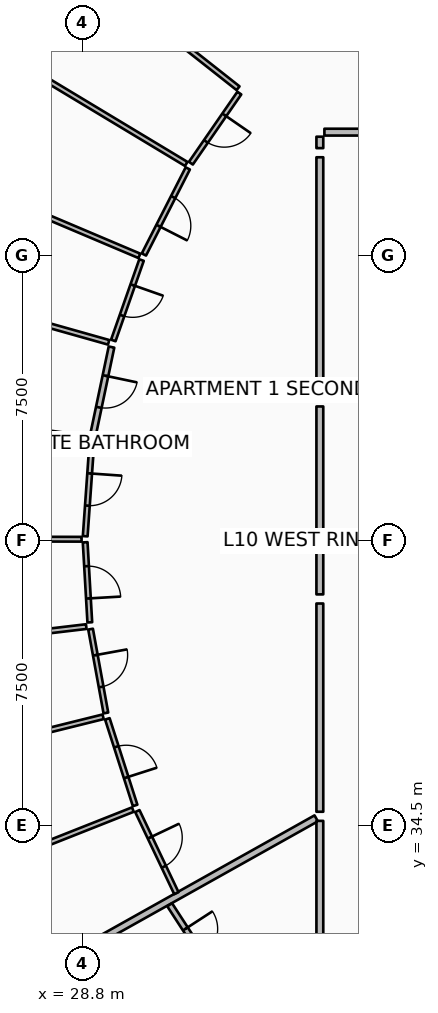
"""IFC4 building model, lengths in metres.
Left out: names, types, materials, properties, quantities, classifications, styles, units other than length and angle.
Written with IfcOpenShell. Run it as: python <this file> out.ifc"""

import sys

from ifc_helpers import new_model, si_unit, direction, frame, frame_2d, origin, place, context, subcontext, project, spatial, rectangle, extrude, element, fill, save


model = new_model("IFC4")
c1 = context("Model", 3, precision=1e-05, world=origin(), true_north=direction((0.0, 1.0)))
c2 = subcontext(c1, "Body", "Model", "MODEL_VIEW")
j1 = project(units=[si_unit("LENGTHUNIT", "METRE"), si_unit("PLANEANGLEUNIT", "RADIAN")], contexts=[c1])
p1 = place(None, origin())
s1 = spatial("IfcSite", under=j1, at=p1, CompositionType="ELEMENT")
p2 = place(p1, origin())
s2 = spatial("IfcBuilding", under=s1, at=p2, CompositionType="ELEMENT")
p3 = place(p2, frame((0.0, 0.0, 45.15)))
s3 = spatial("IfcBuildingStorey", under=s2, at=p3, CompositionType="ELEMENT", Elevation=45.15)
p4 = place(p3, frame((34.954, 34.694, 0.0), z_axis=(0.0, 0.0, 1.0), x_axis=(-0.872493465611, -0.488625779577, 0.0)))
e1 = element("IfcWall", 1, at=p4, inside=s3, PredefinedType="PARTITIONING", context=c2, shape_type="SweptSolid", body=[
    extrude(rectangle(XDim=16.586, YDim=0.18, at=frame_2d((8.293, 0.0))), origin(), (0.0, 0.0, 1.0), 2.867),
])
p5 = place(p3, frame((41.86, 52.75, 0.0), z_axis=(0.0, 0.0, 1.0), x_axis=(-1.0, 0.0, 0.0)))
e2 = element("IfcWall", 2, at=p5, inside=s3, PredefinedType="PARTITIONING", context=c2, shape_type="SweptSolid", body=[
    extrude(rectangle(XDim=6.69, YDim=0.18, at=frame_2d((3.345, 0.0))), origin(), (0.0, 0.0, 1.0), 2.867),
])
p6 = place(p5, frame((2.795, 0.0, 0.0)))
e3 = element("IfcOpeningElement", 3, at=p6, cuts=e2, PredefinedType="OPENING", context=c2, shape_type="SweptSolid", body=[
    extrude(rectangle(XDim=1.1, YDim=2.1, at=frame_2d((0.55, 1.05))), frame((0.0, 0.1, 0.0), z_axis=(0.0, -1.0, 0.0), x_axis=(1.0, 0.0, 0.0)), (0.0, 0.0, 1.0), 0.2),
])
p7 = place(p3, frame((35.05, 52.63, 0.0), z_axis=(0.0, 0.0, 1.0), x_axis=(0.0, -1.0, 0.0)))
e4 = element("IfcWall", 4, at=p7, inside=s3, PredefinedType="PARTITIONING", context=c2, shape_type="SweptSolid", body=[
    extrude(rectangle(XDim=0.301, YDim=0.18, at=frame_2d((0.15, 0.0))), origin(), (0.0, 0.0, 1.0), 2.867),
])
p8 = place(p3, frame((35.05, 52.089, 0.0), z_axis=(0.0, 0.0, 1.0), x_axis=(0.0, -1.0, 0.0)))
e5 = element("IfcWall", 5, at=p8, inside=s3, PredefinedType="PARTITIONING", context=c2, shape_type="SweptSolid", body=[
    extrude(rectangle(XDim=6.317, YDim=0.18, at=frame_2d((3.158, 0.0))), origin(), (0.0, 0.0, 1.0), 2.867),
])
p9 = place(p3, frame((32.898, 53.905, 0.0), z_axis=(0.0, 0.0, 1.0), x_axis=(-0.78532854108, 0.619079221558, 0.0)))
e6 = element("IfcWall", 6, at=p9, inside=s3, PredefinedType="PARTITIONING", context=c2, shape_type="SweptSolid", body=[
    extrude(rectangle(XDim=8.842, YDim=0.125, at=frame_2d((4.421, 0.0))), origin(), (0.0, 0.0, 1.0), 2.867),
])
p10 = place(p3, frame((31.534, 51.913, 0.0), z_axis=(0.0, 0.0, 1.0), x_axis=(-0.856706990958, 0.515803384676, 0.0)))
e7 = element("IfcWall", 7, at=p10, inside=s3, PredefinedType="PARTITIONING", context=c2, shape_type="SweptSolid", body=[
    extrude(rectangle(XDim=9.057, YDim=0.125, at=frame_2d((4.528, 0.0))), origin(), (0.0, 0.0, 1.0), 2.94),
])
p11 = place(p3, frame((30.301, 49.494, 0.0), z_axis=(0.0, 0.0, 1.0), x_axis=(-0.920840746031, 0.389938867579, 0.0)))
e8 = element("IfcWall", 8, at=p11, inside=s3, PredefinedType="PARTITIONING", context=c2, shape_type="SweptSolid", body=[
    extrude(rectangle(XDim=9.966, YDim=0.125, at=frame_2d((4.983, 0.0))), origin(), (0.0, 0.0, 1.0), 2.94),
])
p12 = place(p3, frame((32.931, 53.778, 0.0), z_axis=(0.0, 0.0, 1.0), x_axis=(-0.568541738061, -0.822654418382, 0.0)))
e9 = element("IfcWall", 9, at=p12, inside=s3, PredefinedType="PARTITIONING", context=c2, shape_type="SweptSolid", body=[
    extrude(rectangle(XDim=2.242, YDim=0.125, at=frame_2d((1.121, 0.0))), origin(), (0.0, 0.0, 1.0), 2.867),
])
p13 = place(p12, frame((0.696, 0.0, 0.0)))
e10 = element("IfcOpeningElement", 10, at=p13, cuts=e9, PredefinedType="OPENING", context=c2, shape_type="SweptSolid", body=[
    extrude(rectangle(XDim=0.85, YDim=2.06, at=frame_2d((0.425, 1.03))), frame((0.0, 0.073, 0.0), z_axis=(0.0, -1.0, 0.0), x_axis=(1.0, 0.0, 0.0)), (0.0, 0.0, 1.0), 0.145),
])
p14 = place(p3, frame((31.575, 51.796, 0.0), z_axis=(0.0, 0.0, 1.0), x_axis=(-0.454037986735, -0.890982326762, 0.0)))
e11 = element("IfcWall", 11, at=p14, inside=s3, PredefinedType="PARTITIONING", context=c2, shape_type="SweptSolid", body=[
    extrude(rectangle(XDim=2.542, YDim=0.125, at=frame_2d((1.271, 0.0))), origin(), (0.0, 0.0, 1.0), 2.94),
])
p15 = place(p14, frame((0.846, 0.0, 0.0)))
e12 = element("IfcOpeningElement", 12, at=p15, cuts=e11, PredefinedType="OPENING", context=c2, shape_type="SweptSolid", body=[
    extrude(rectangle(XDim=0.85, YDim=2.06, at=frame_2d((0.425, 1.03))), frame((0.0, 0.073, 0.0), z_axis=(0.0, -1.0, 0.0), x_axis=(1.0, 0.0, 0.0)), (0.0, 0.0, 1.0), 0.145),
])
p16 = place(p3, frame((30.358, 49.384, 0.0), z_axis=(0.0, 0.0, 1.0), x_axis=(-0.331344536708, -0.943509829304, 0.0)))
e13 = element("IfcWall", 13, at=p16, inside=s3, PredefinedType="PARTITIONING", context=c2, shape_type="SweptSolid", body=[
    extrude(rectangle(XDim=2.242, YDim=0.125, at=frame_2d((1.121, 0.0))), origin(), (0.0, 0.0, 1.0), 2.867),
])
p17 = place(p16, frame((0.696, 0.0, 0.0)))
e14 = element("IfcOpeningElement", 14, at=p17, cuts=e13, PredefinedType="OPENING", context=c2, shape_type="SweptSolid", body=[
    extrude(rectangle(XDim=0.85, YDim=2.06, at=frame_2d((0.425, 1.03))), frame((0.0, 0.073, 0.0), z_axis=(0.0, -1.0, 0.0), x_axis=(1.0, 0.0, 0.0)), (0.0, 0.0, 1.0), 0.145),
])
p18 = place(p3, frame((35.05, 45.532, 0.0), z_axis=(0.0, 0.0, 1.0), x_axis=(0.0, -1.0, 0.0)))
e15 = element("IfcWall", 15, at=p18, inside=s3, PredefinedType="PARTITIONING", context=c2, shape_type="SweptSolid", body=[
    extrude(rectangle(XDim=4.945, YDim=0.18, at=frame_2d((2.472, 0.0))), origin(), (0.0, 0.0, 1.0), 2.867),
])
p19 = place(p3, frame((29.492, 47.22, 0.0), z_axis=(0.0, 0.0, 1.0), x_axis=(-0.962454721813, 0.271442274635, 0.0)))
e16 = element("IfcWall", 16, at=p19, inside=s3, PredefinedType="PARTITIONING", context=c2, shape_type="SweptSolid", body=[
    extrude(rectangle(XDim=11.344, YDim=0.125, at=frame_2d((5.672, 0.0))), origin(), (0.0, 0.0, 1.0), 2.867),
])
p20 = place(p3, frame((29.568, 47.095, 0.0), z_axis=(0.0, 0.0, 1.0), x_axis=(-0.205861309483, -0.978581177654, 0.0)))
e17 = element("IfcWall", 17, at=p20, inside=s3, PredefinedType="PARTITIONING", context=c2, shape_type="SweptSolid", body=[
    extrude(rectangle(XDim=2.392, YDim=0.15, at=frame_2d((1.196, 0.0))), origin(), (0.0, 0.0, 1.0), 2.867),
])
p21 = place(p20, frame((0.771, 0.0, 0.0)))
e18 = element("IfcOpeningElement", 18, at=p21, cuts=e17, PredefinedType="OPENING", context=c2, shape_type="SweptSolid", body=[
    extrude(rectangle(XDim=0.85, YDim=2.06, at=frame_2d((0.425, 1.03))), frame((0.0, 0.085, 0.0), z_axis=(0.0, -1.0, 0.0), x_axis=(1.0, 0.0, 0.0)), (0.0, 0.0, 1.0), 0.17),
])
p22 = place(p3, frame((28.968, 44.678, 0.0), z_axis=(0.0, 0.0, 1.0), x_axis=(-0.990240767804, 0.139367219172, 0.0)))
e19 = element("IfcWall", 19, at=p22, inside=s3, PredefinedType="PARTITIONING", context=c2, shape_type="SweptSolid", body=[
    extrude(rectangle(XDim=4.46, YDim=0.15, at=frame_2d((2.23, 0.0))), origin(), (0.0, 0.0, 1.0), 2.94),
])
p23 = place(p3, frame((28.78, 42.038, 0.0), z_axis=(0.0, 0.0, 1.0), x_axis=(-0.999998036955, 0.001981435282, 0.0)))
e20 = element("IfcWall", 20, at=p23, inside=s3, PredefinedType="PARTITIONING", context=c2, shape_type="SweptSolid", body=[
    extrude(rectangle(XDim=12.075, YDim=0.125, at=frame_2d((6.038, 0.0))), origin(), (0.0, 0.0, 1.0), 2.94),
])
p24 = place(p3, frame((29.05, 44.576, 0.0), z_axis=(0.0, 0.0, 1.0), x_axis=(-0.070831673661, -0.997488282641, 0.0)))
e21 = element("IfcWall", 21, at=p24, inside=s3, PredefinedType="PARTITIONING", context=c2, shape_type="SweptSolid", body=[
    extrude(rectangle(XDim=2.464, YDim=0.125, at=frame_2d((1.232, 0.0))), origin(), (0.0, 0.0, 1.0), 2.94),
])
p25 = place(p24, frame((0.807, 0.0, 0.0)))
e22 = element("IfcOpeningElement", 22, at=p25, cuts=e21, PredefinedType="OPENING", context=c2, shape_type="SweptSolid", body=[
    extrude(rectangle(XDim=0.85, YDim=2.06, at=frame_2d((0.425, 1.03))), frame((0.0, 0.073, 0.0), z_axis=(0.0, -1.0, 0.0), x_axis=(1.0, 0.0, 0.0)), (0.0, 0.0, 1.0), 0.145),
])
p26 = place(p3, frame((28.875, 41.958, 0.0), z_axis=(0.0, 0.0, 1.0), x_axis=(0.057962417622, -0.998318765797, 0.0)))
e23 = element("IfcWall", 23, at=p26, inside=s3, PredefinedType="PARTITIONING", context=c2, shape_type="SweptSolid", body=[
    extrude(rectangle(XDim=2.11, YDim=0.125, at=frame_2d((1.055, 0.0))), origin(), (0.0, 0.0, 1.0), 2.867),
])
p27 = place(p26, frame((0.63, 0.0, 0.0)))
e24 = element("IfcOpeningElement", 24, at=p27, cuts=e23, PredefinedType="OPENING", context=c2, shape_type="SweptSolid", body=[
    extrude(rectangle(XDim=0.85, YDim=2.06, at=frame_2d((0.425, 1.03))), frame((0.0, 0.073, 0.0), z_axis=(0.0, -1.0, 0.0), x_axis=(1.0, 0.0, 0.0)), (0.0, 0.0, 1.0), 0.145),
])
p28 = place(p3, frame((35.05, 40.347, 0.0), z_axis=(0.0, 0.0, 1.0), x_axis=(0.0, -1.0, 0.0)))
e25 = element("IfcWall", 25, at=p28, inside=s3, PredefinedType="PARTITIONING", context=c2, shape_type="SweptSolid", body=[
    extrude(rectangle(XDim=5.48, YDim=0.18, at=frame_2d((2.74, 0.0))), origin(), (0.0, 0.0, 1.0), 2.867),
])
p29 = place(p3, frame((28.903, 39.74, 0.0), z_axis=(0.0, 0.0, 1.0), x_axis=(-0.993068040113, -0.117540919282, 0.0)))
e26 = element("IfcWall", 26, at=p29, inside=s3, PredefinedType="PARTITIONING", context=c2, shape_type="SweptSolid", body=[
    extrude(rectangle(XDim=12.309, YDim=0.125, at=frame_2d((6.154, 0.0))), origin(), (0.0, 0.0, 1.0), 2.867),
])
p30 = place(p3, frame((29.347, 37.366, 0.0), z_axis=(0.0, 0.0, 1.0), x_axis=(-0.970510462135, -0.241059002917, 0.0)))
e27 = element("IfcWall", 27, at=p30, inside=s3, PredefinedType="PARTITIONING", context=c2, shape_type="SweptSolid", body=[
    extrude(rectangle(XDim=11.79, YDim=0.125, at=frame_2d((5.895, 0.0))), origin(), (0.0, 0.0, 1.0), 2.94),
])
p31 = place(p3, frame((30.13, 34.925, 0.0), z_axis=(0.0, 0.0, 1.0), x_axis=(-0.929770978957, -0.368138461302, 0.0)))
e28 = element("IfcWall", 28, at=p31, inside=s3, PredefinedType="PARTITIONING", context=c2, shape_type="SweptSolid", body=[
    extrude(rectangle(XDim=11.773, YDim=0.125, at=frame_2d((5.887, 0.0))), origin(), (0.0, 0.0, 1.0), 2.94),
])
p32 = place(p3, frame((29.017, 39.673, 0.0), z_axis=(0.0, 0.0, 1.0), x_axis=(0.179632658462, -0.983733758704, 0.0)))
e29 = element("IfcWall", 29, at=p32, inside=s3, PredefinedType="PARTITIONING", context=c2, shape_type="SweptSolid", body=[
    extrude(rectangle(XDim=2.242, YDim=0.125, at=frame_2d((1.121, 0.0))), origin(), (0.0, 0.0, 1.0), 2.867),
])
p33 = place(p32, frame((0.696, 0.0, 0.0)))
e30 = element("IfcOpeningElement", 30, at=p33, cuts=e29, PredefinedType="OPENING", context=c2, shape_type="SweptSolid", body=[
    extrude(rectangle(XDim=0.85, YDim=2.06, at=frame_2d((0.425, 1.03))), frame((0.0, 0.073, 0.0), z_axis=(0.0, -1.0, 0.0), x_axis=(1.0, 0.0, 0.0)), (0.0, 0.0, 1.0), 0.145),
])
p34 = place(p3, frame((29.458, 37.312, 0.0), z_axis=(0.0, 0.0, 1.0), x_axis=(0.305338513131, -0.952243872335, 0.0)))
e31 = element("IfcWall", 31, at=p34, inside=s3, PredefinedType="PARTITIONING", context=c2, shape_type="SweptSolid", body=[
    extrude(rectangle(XDim=2.392, YDim=0.125, at=frame_2d((1.196, 0.0))), origin(), (0.0, 0.0, 1.0), 2.94),
])
p35 = place(p34, frame((0.771, 0.0, 0.0)))
e32 = element("IfcOpeningElement", 32, at=p35, cuts=e31, PredefinedType="OPENING", context=c2, shape_type="SweptSolid", body=[
    extrude(rectangle(XDim=0.85, YDim=2.06, at=frame_2d((0.425, 1.03))), frame((0.0, 0.073, 0.0), z_axis=(0.0, -1.0, 0.0), x_axis=(1.0, 0.0, 0.0)), (0.0, 0.0, 1.0), 0.145),
])
p36 = place(p3, frame((30.248, 34.885, 0.0), z_axis=(0.0, 0.0, 1.0), x_axis=(0.429366977128, -0.903130111862, 0.0)))
e33 = element("IfcWall", 33, at=p36, inside=s3, PredefinedType="PARTITIONING", context=c2, shape_type="SweptSolid", body=[
    extrude(rectangle(XDim=2.392, YDim=0.125, at=frame_2d((1.196, 0.0))), origin(), (0.0, 0.0, 1.0), 2.867),
])
p37 = place(p36, frame((0.771, 0.0, 0.0)))
e34 = element("IfcOpeningElement", 34, at=p37, cuts=e33, PredefinedType="OPENING", context=c2, shape_type="SweptSolid", body=[
    extrude(rectangle(XDim=0.85, YDim=2.06, at=frame_2d((0.425, 1.03))), frame((0.0, 0.073, 0.0), z_axis=(0.0, -1.0, 0.0), x_axis=(1.0, 0.0, 0.0)), (0.0, 0.0, 1.0), 0.145),
])
p38 = place(p3, frame((35.05, 34.628, 0.0), z_axis=(0.0, 0.0, 1.0), x_axis=(0.0, -1.0, 0.0)))
e35 = element("IfcWall", 35, at=p38, inside=s3, PredefinedType="PARTITIONING", context=c2, shape_type="SweptSolid", body=[
    extrude(rectangle(XDim=3.258, YDim=0.18, at=frame_2d((1.629, 0.0))), origin(), (0.0, 0.0, 1.0), 2.867),
])
p39 = place(p3, frame((31.098, 32.42, 0.0), z_axis=(0.0, 0.0, 1.0), x_axis=(0.544893998924, -0.838504937336, 0.0)))
e36 = element("IfcWall", 36, at=p39, inside=s3, PredefinedType="PARTITIONING", context=c2, shape_type="SweptSolid", body=[
    extrude(rectangle(XDim=2.365, YDim=0.15, at=frame_2d((1.182, 0.0))), origin(), (0.0, 0.0, 1.0), 2.867),
])
p40 = place(p39, frame((0.757, 0.0, 0.0)))
e37 = element("IfcOpeningElement", 37, at=p40, cuts=e36, PredefinedType="OPENING", context=c2, shape_type="SweptSolid", body=[
    extrude(rectangle(XDim=0.85, YDim=2.06, at=frame_2d((0.425, 1.03))), frame((0.0, 0.085, 0.0), z_axis=(0.0, -1.0, 0.0), x_axis=(1.0, 0.0, 0.0)), (0.0, 0.0, 1.0), 0.17),
])
p41 = place(p13, origin())
e38 = element("IfcDoor", 38, at=p41, inside=s3, OperationType="SINGLE_SWING_LEFT", PredefinedType="DOOR", context=c2, shape_type="SweptSolid", body=[
    extrude(rectangle(XDim=0.85, YDim=2.06, at=frame_2d((0.425, 1.03))), frame((0.0, 0.025, 0.0), z_axis=(0.0, -1.0, 0.0), x_axis=(1.0, 0.0, 0.0)), (0.0, 0.0, 1.0), 0.05),
])
fill(e10, e38)
p42 = place(p15, origin())
e39 = element("IfcDoor", 39, at=p42, inside=s3, OperationType="SINGLE_SWING_RIGHT", PredefinedType="DOOR", context=c2, shape_type="SweptSolid", body=[
    extrude(rectangle(XDim=0.85, YDim=2.06, at=frame_2d((0.425, 1.03))), frame((0.0, 0.025, 0.0), z_axis=(0.0, -1.0, 0.0), x_axis=(1.0, 0.0, 0.0)), (0.0, 0.0, 1.0), 0.05),
])
fill(e12, e39)
p43 = place(p17, origin())
e40 = element("IfcDoor", 40, at=p43, inside=s3, OperationType="SINGLE_SWING_LEFT", PredefinedType="DOOR", context=c2, shape_type="SweptSolid", body=[
    extrude(rectangle(XDim=0.85, YDim=2.06, at=frame_2d((0.425, 1.03))), frame((0.0, 0.025, 0.0), z_axis=(0.0, -1.0, 0.0), x_axis=(1.0, 0.0, 0.0)), (0.0, 0.0, 1.0), 0.05),
])
fill(e14, e40)
p44 = place(p21, origin())
e41 = element("IfcDoor", 41, at=p44, inside=s3, OperationType="SINGLE_SWING_LEFT", PredefinedType="DOOR", context=c2, shape_type="SweptSolid", body=[
    extrude(rectangle(XDim=0.85, YDim=2.06, at=frame_2d((0.425, 1.03))), frame((0.0, 0.025, 0.0), z_axis=(0.0, -1.0, 0.0), x_axis=(1.0, 0.0, 0.0)), (0.0, 0.0, 1.0), 0.05),
])
fill(e18, e41)
p45 = place(p25, origin())
e42 = element("IfcDoor", 42, at=p45, inside=s3, OperationType="SINGLE_SWING_LEFT", PredefinedType="DOOR", context=c2, shape_type="SweptSolid", body=[
    extrude(rectangle(XDim=0.85, YDim=2.06, at=frame_2d((0.425, 1.03))), frame((0.0, 0.025, 0.0), z_axis=(0.0, -1.0, 0.0), x_axis=(1.0, 0.0, 0.0)), (0.0, 0.0, 1.0), 0.05),
])
fill(e22, e42)
p46 = place(p27, origin())
e43 = element("IfcDoor", 43, at=p46, inside=s3, OperationType="SINGLE_SWING_RIGHT", PredefinedType="DOOR", context=c2, shape_type="SweptSolid", body=[
    extrude(rectangle(XDim=0.85, YDim=2.06, at=frame_2d((0.425, 1.03))), frame((0.0, 0.025, 0.0), z_axis=(0.0, -1.0, 0.0), x_axis=(1.0, 0.0, 0.0)), (0.0, 0.0, 1.0), 0.05),
])
fill(e24, e43)
p47 = place(p33, origin())
e44 = element("IfcDoor", 44, at=p47, inside=s3, OperationType="SINGLE_SWING_LEFT", PredefinedType="DOOR", context=c2, shape_type="SweptSolid", body=[
    extrude(rectangle(XDim=0.85, YDim=2.06, at=frame_2d((0.425, 1.03))), frame((0.0, 0.025, 0.0), z_axis=(0.0, -1.0, 0.0), x_axis=(1.0, 0.0, 0.0)), (0.0, 0.0, 1.0), 0.05),
])
fill(e30, e44)
p48 = place(p35, origin())
e45 = element("IfcDoor", 45, at=p48, inside=s3, OperationType="SINGLE_SWING_RIGHT", PredefinedType="DOOR", context=c2, shape_type="SweptSolid", body=[
    extrude(rectangle(XDim=0.85, YDim=2.06, at=frame_2d((0.425, 1.03))), frame((0.0, 0.025, 0.0), z_axis=(0.0, -1.0, 0.0), x_axis=(1.0, 0.0, 0.0)), (0.0, 0.0, 1.0), 0.05),
])
fill(e32, e45)
p49 = place(p37, origin())
e46 = element("IfcDoor", 46, at=p49, inside=s3, OperationType="SINGLE_SWING_LEFT", PredefinedType="DOOR", context=c2, shape_type="SweptSolid", body=[
    extrude(rectangle(XDim=0.85, YDim=2.06, at=frame_2d((0.425, 1.03))), frame((0.0, 0.025, 0.0), z_axis=(0.0, -1.0, 0.0), x_axis=(1.0, 0.0, 0.0)), (0.0, 0.0, 1.0), 0.05),
])
fill(e34, e46)
p50 = place(p40, origin())
e47 = element("IfcDoor", 47, at=p50, inside=s3, OperationType="SINGLE_SWING_LEFT", PredefinedType="DOOR", context=c2, shape_type="SweptSolid", body=[
    extrude(rectangle(XDim=0.85, YDim=2.06, at=frame_2d((0.425, 1.03))), frame((0.0, 0.025, 0.0), z_axis=(0.0, -1.0, 0.0), x_axis=(1.0, 0.0, 0.0)), (0.0, 0.0, 1.0), 0.05),
])
fill(e37, e47)
save(model, sys.argv[1])
